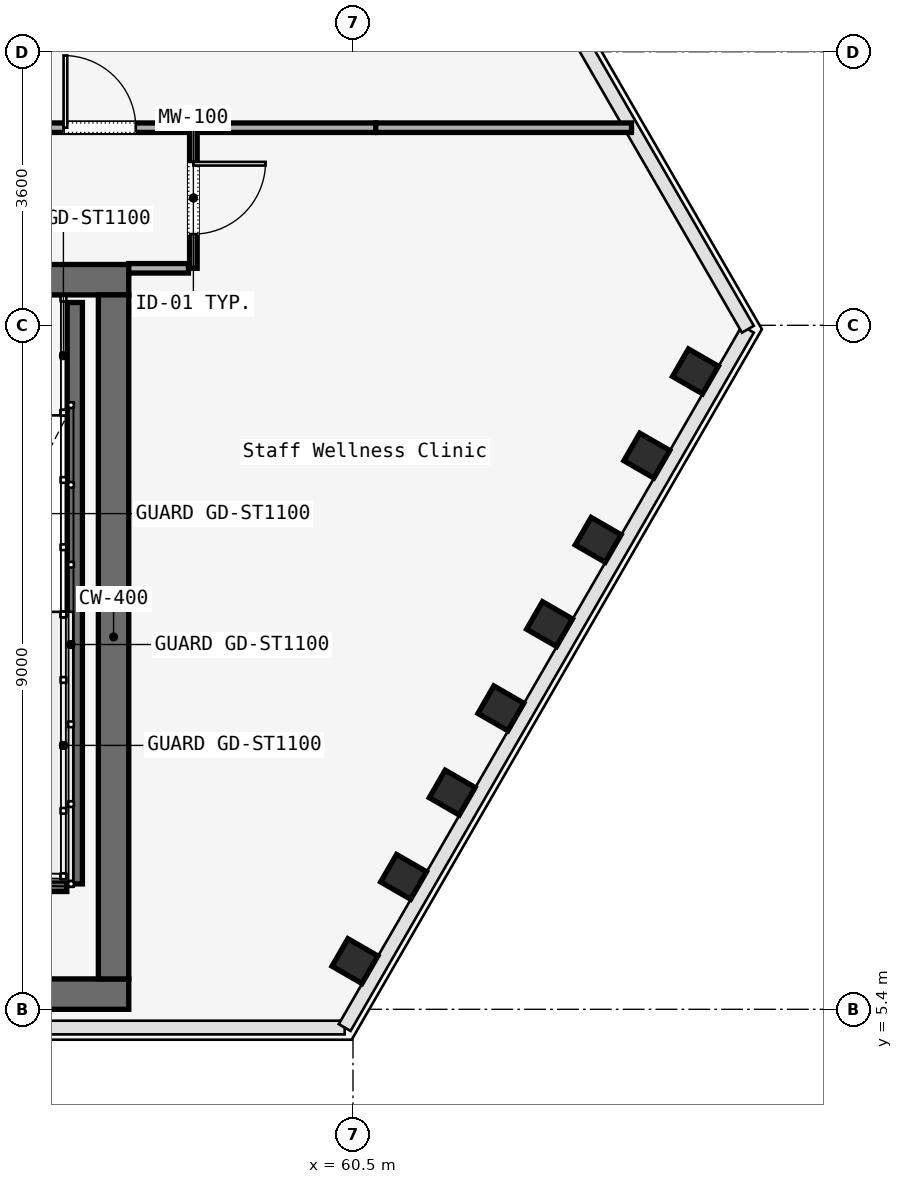
"""IFC4 building model, lengths in metres.
Left out: names, types, materials, properties, quantities, classifications, styles, units other than length and angle.
Written with IfcOpenShell. Run it as: python <this file> out.ifc"""

import sys

from ifc_helpers import new_model, si_unit, direction, frame, frame_2d, origin, origin_2d, place, context, subcontext, project, spatial, rectangle, i_section, extrude, element, fill, save


model = new_model("IFC4")
c1 = context("Model", 3, precision=1e-05, world=origin(), true_north=direction((0.0, 1.0)))
c2 = subcontext(c1, "Body", "Model", "MODEL_VIEW")
j1 = project(units=[si_unit("LENGTHUNIT", "METRE"), si_unit("PLANEANGLEUNIT", "RADIAN")], contexts=[c1])
p1 = place(None, origin())
s1 = spatial("IfcSite", under=j1, at=p1, CompositionType="ELEMENT")
p2 = place(p1, origin())
s2 = spatial("IfcBuilding", under=s1, at=p2, CompositionType="ELEMENT")
p3 = place(p2, frame((0.0, 0.0, 168.8)))
s3 = spatial("IfcBuildingStorey", under=s2, at=p3, CompositionType="ELEMENT", Elevation=168.8)
p4 = place(p3, frame((26.45, 15.0, 0.0), z_axis=(0.0, 0.0, 1.0), x_axis=(1.0, 0.0, 0.0)))
e1 = element("IfcWall", 1, at=p4, inside=s3, PredefinedType="SOLIDWALL", context=c2, shape_type="SweptSolid", body=[
    extrude(rectangle(XDim=31.1, YDim=0.4, at=frame_2d((15.55, 0.0))), origin(), (0.0, 0.0, 1.0), 3.58),
])
p5 = place(p4, frame((1.65, 0.0, 0.0)))
e2 = element("IfcOpeningElement", 2, at=p5, cuts=e1, PredefinedType="OPENING", context=c2, shape_type="SweptSolid", body=[
    extrude(rectangle(XDim=1.1, YDim=2.2, at=frame_2d((0.55, 1.1))), frame((0.0, 0.2, 0.0), z_axis=(0.0, -1.0, 0.0), x_axis=(1.0, 0.0, 0.0)), (0.0, 0.0, 1.0), 0.4),
])
p6 = place(p4, frame((13.65, 0.0, 0.0)))
e3 = element("IfcOpeningElement", 3, at=p6, cuts=e1, PredefinedType="OPENING", context=c2, shape_type="SweptSolid", body=[
    extrude(rectangle(XDim=1.1, YDim=2.2, at=frame_2d((0.55, 1.1))), frame((0.0, 0.2, 0.0), z_axis=(0.0, -1.0, 0.0), x_axis=(1.0, 0.0, 0.0)), (0.0, 0.0, 1.0), 0.4),
])
p7 = place(p4, frame((25.55, 0.0, 0.0)))
e4 = element("IfcOpeningElement", 4, at=p7, cuts=e1, PredefinedType="OPENING", context=c2, shape_type="SweptSolid", body=[
    extrude(rectangle(XDim=1.1, YDim=2.2, at=frame_2d((0.55, 1.1))), frame((0.0, 0.2, 0.0), z_axis=(0.0, -1.0, 0.0), x_axis=(1.0, 0.0, 0.0)), (0.0, 0.0, 1.0), 0.4),
])
p8 = place(p4, frame((10.7, 0.0, 0.0)))
e5 = element("IfcOpeningElement", 5, at=p8, cuts=e1, PredefinedType="OPENING", context=c2, shape_type="SweptSolid", body=[
    extrude(rectangle(XDim=1.4, YDim=2.2, at=frame_2d((0.7, 1.1))), frame((0.0, 0.2, 0.0), z_axis=(0.0, -1.0, 0.0), x_axis=(1.0, 0.0, 0.0)), (0.0, 0.0, 1.0), 0.4),
])
p9 = place(p4, frame((19.35, 0.0, 0.0)))
e6 = element("IfcOpeningElement", 6, at=p9, cuts=e1, PredefinedType="OPENING", context=c2, shape_type="SweptSolid", body=[
    extrude(rectangle(XDim=1.1, YDim=2.2, at=frame_2d((0.55, 1.1))), frame((0.0, 0.2, 0.0), z_axis=(0.0, -1.0, 0.0), x_axis=(1.0, 0.0, 0.0)), (0.0, 0.0, 1.0), 0.4),
])
p10 = place(p4, frame((21.4, 0.0, 0.0)))
e7 = element("IfcOpeningElement", 7, at=p10, cuts=e1, PredefinedType="OPENING", context=c2, shape_type="SweptSolid", body=[
    extrude(rectangle(XDim=0.9, YDim=2.1, at=frame_2d((0.45, 1.05))), frame((0.0, 0.2, 0.0), z_axis=(0.0, -1.0, 0.0), x_axis=(1.0, 0.0, 0.0)), (0.0, 0.0, 1.0), 0.4),
])
p11 = place(p4, frame((23.35, 0.0, 0.0)))
e8 = element("IfcOpeningElement", 8, at=p11, cuts=e1, PredefinedType="OPENING", context=c2, shape_type="SweptSolid", body=[
    extrude(rectangle(XDim=1.3, YDim=2.3, at=frame_2d((0.65, 1.15))), frame((0.0, 0.2, 0.0), z_axis=(0.0, -1.0, 0.0), x_axis=(1.0, 0.0, 0.0)), (0.0, 0.0, 1.0), 0.4),
])
p12 = place(p3, frame((26.45, 5.6, 0.0), z_axis=(0.0, 0.0, 1.0), x_axis=(1.0, 0.0, 0.0)))
e9 = element("IfcWall", 9, at=p12, inside=s3, PredefinedType="SOLIDWALL", context=c2, shape_type="SweptSolid", body=[
    extrude(rectangle(XDim=31.1, YDim=0.4, at=frame_2d((15.55, 0.0))), origin(), (0.0, 0.0, 1.0), 3.58),
])
p13 = place(p3, frame((57.35, 5.8, 0.0), z_axis=(0.0, 0.0, 1.0), x_axis=(0.0, 1.0, 0.0)))
e10 = element("IfcWall", 10, at=p13, inside=s3, PredefinedType="SOLIDWALL", context=c2, shape_type="SweptSolid", body=[
    extrude(rectangle(XDim=9.0, YDim=0.4, at=frame_2d((4.5, 0.0))), origin(), (0.0, 0.0, 1.0), 3.58),
])
p14 = place(p3, frame((60.526, 6.034, 0.0), z_axis=(0.082103059237, -0.008563729689, 0.996587050988), x_axis=(-0.806541885036, 0.586838564114, 0.071489071554)))
e11 = element("IfcColumn", 11, at=p14, inside=s3, PredefinedType="COLUMN", context=c2, shape_type="SweptSolid", body=[
    extrude(i_section(OverallWidth=0.418, OverallDepth=0.455, WebThickness=0.042, FlangeThickness=0.052, FilletRadius=0.015, at=origin_2d()), origin(), (0.0, 0.0, 1.0), 3.592),
])
p15 = place(p3, frame((61.166, 7.143, 0.0), z_axis=(0.072213729702, -0.025907185515, 0.997052654067), x_axis=(-0.643910482104, 0.762210461272, 0.066441732097)))
e12 = element("IfcColumn", 12, at=p15, inside=s3, PredefinedType="COLUMN", context=c2, shape_type="SweptSolid", body=[
    extrude(i_section(OverallWidth=0.418, OverallDepth=0.455, WebThickness=0.042, FlangeThickness=0.052, FilletRadius=0.015, at=origin_2d()), origin(), (0.0, 0.0, 1.0), 3.59),
])
p16 = place(p3, frame((61.806, 8.251, 0.0), z_axis=(0.062222727162, -0.043181892621, 0.997127703142), x_axis=(-0.42436373933, 0.903113037788, 0.065591597932)))
e13 = element("IfcColumn", 13, at=p16, inside=s3, PredefinedType="COLUMN", context=c2, shape_type="SweptSolid", body=[
    extrude(i_section(OverallWidth=0.418, OverallDepth=0.455, WebThickness=0.042, FlangeThickness=0.052, FilletRadius=0.015, at=origin_2d()), origin(), (0.0, 0.0, 1.0), 3.59),
])
p17 = place(p3, frame((62.446, 9.36, 0.0), z_axis=(0.052277437958, -0.060367184534, 0.996806336513), x_axis=(-0.187152330138, 0.979893443037, 0.069158120391)))
e14 = element("IfcColumn", 14, at=p17, inside=s3, PredefinedType="COLUMN", context=c2, shape_type="SweptSolid", body=[
    extrude(i_section(OverallWidth=0.418, OverallDepth=0.455, WebThickness=0.042, FlangeThickness=0.052, FilletRadius=0.015, at=origin_2d()), origin(), (0.0, 0.0, 1.0), 3.591),
])
p18 = place(p3, frame((63.086, 10.469, 0.0), z_axis=(0.042253853596, -0.07757861866, 0.996090442572), x_axis=(0.026482675883, 0.996717510238, 0.076504069583)))
e15 = element("IfcColumn", 15, at=p18, inside=s3, PredefinedType="COLUMN", context=c2, shape_type="SweptSolid", body=[
    extrude(i_section(OverallWidth=0.418, OverallDepth=0.455, WebThickness=0.042, FlangeThickness=0.052, FilletRadius=0.015, at=origin_2d()), origin(), (0.0, 0.0, 1.0), 3.594),
])
p19 = place(p3, frame((63.726, 11.577, 0.0), z_axis=(0.032299876946, -0.094660353653, 0.994985495068), x_axis=(0.194941646641, 0.976982525919, 0.08661927299)))
e16 = element("IfcColumn", 16, at=p19, inside=s3, PredefinedType="COLUMN", context=c2, shape_type="SweptSolid", body=[
    extrude(i_section(OverallWidth=0.418, OverallDepth=0.455, WebThickness=0.042, FlangeThickness=0.052, FilletRadius=0.015, at=origin_2d()), origin(), (0.0, 0.0, 1.0), 3.598),
])
p20 = place(p3, frame((64.366, 12.686, 0.0), z_axis=(0.022291333243, -0.111727685465, 0.993488812601), x_axis=(0.321993963103, 0.941586375909, 0.098666024689)))
e17 = element("IfcColumn", 17, at=p20, inside=s3, PredefinedType="COLUMN", context=c2, shape_type="SweptSolid", body=[
    extrude(i_section(OverallWidth=0.418, OverallDepth=0.455, WebThickness=0.042, FlangeThickness=0.052, FilletRadius=0.015, at=origin_2d()), origin(), (0.0, 0.0, 1.0), 3.603),
])
p21 = place(p3, frame((65.006, 13.794, 0.0), z_axis=(0.012375647772, -0.12869321153, 0.991607231039), x_axis=(0.41550177193, 0.902674887769, 0.111965729193)))
e18 = element("IfcColumn", 18, at=p21, inside=s3, PredefinedType="COLUMN", context=c2, shape_type="SweptSolid", body=[
    extrude(i_section(OverallWidth=0.418, OverallDepth=0.455, WebThickness=0.042, FlangeThickness=0.052, FilletRadius=0.015, at=origin_2d()), origin(), (0.0, 0.0, 1.0), 3.61),
])
p22 = place(p3, frame((56.84, 14.7, 0.0), z_axis=(0.0, 0.0, 1.0), x_axis=(0.0, -1.0, 0.0)))
e19 = element("IfcWall", 19, at=p22, inside=s3, PredefinedType="SOLIDWALL", context=c2, shape_type="SweptSolid", body=[
    extrude(rectangle(XDim=7.65, YDim=0.2, at=frame_2d((3.825, 0.0))), origin(), (0.0, 0.0, 1.0), 3.8),
])
p23 = place(p3, frame((53.62, 7.05, 0.0), z_axis=(0.0, 0.0, 1.0), x_axis=(1.0, 0.0, 0.0)))
e20 = element("IfcWall", 20, at=p23, inside=s3, PredefinedType="SOLIDWALL", context=c2, shape_type="SweptSolid", body=[
    extrude(rectangle(XDim=3.115, YDim=0.2, at=frame_2d((1.558, 0.0))), origin(), (0.0, 0.0, 1.0), 3.8),
])
p24 = place(p3, frame((58.4, 17.0, 0.0), z_axis=(0.0, 0.0, 1.0), x_axis=(0.0, -1.0, 0.0)))
e21 = element("IfcWall", 21, at=p24, inside=s3, PredefinedType="MOVABLE", context=c2, shape_type="SweptSolid", body=[
    extrude(rectangle(XDim=1.85, YDim=0.1, at=frame_2d((0.925, 0.0))), origin(), (0.0, 0.0, 1.0), 3.01),
])
p25 = place(p24, frame((0.45, 0.0, 0.0)))
e22 = element("IfcOpeningElement", 22, at=p25, cuts=e21, PredefinedType="OPENING", context=c2, shape_type="SweptSolid", body=[
    extrude(rectangle(XDim=0.95, YDim=2.2, at=frame_2d((0.475, 1.1))), frame((0.0, 0.05, 0.0), z_axis=(0.0, -1.0, 0.0), x_axis=(1.0, 0.0, 0.0)), (0.0, 0.0, 1.0), 0.1),
])
p26 = place(p3, frame((58.335, 15.15, 0.0), z_axis=(0.0, 0.0, 1.0), x_axis=(-1.0, 0.0, 0.0)))
e23 = element("IfcWall", 23, at=p26, inside=s3, PredefinedType="PARTITIONING", context=c2, shape_type="SweptSolid", body=[
    extrude(rectangle(XDim=0.785, YDim=0.125, at=frame_2d((0.393, 0.0))), origin(), (0.0, 0.0, 1.0), 3.01),
])
p27 = place(p3, frame((56.0, 17.0, 0.0), z_axis=(0.0, 0.0, 1.0), x_axis=(1.0, 0.0, 0.0)))
e24 = element("IfcWall", 24, at=p27, inside=s3, PredefinedType="PARTITIONING", context=c2, shape_type="SweptSolid", body=[
    extrude(rectangle(XDim=2.335, YDim=0.125, at=frame_2d((1.167, 0.0))), origin(), (0.0, 0.0, 1.0), 3.01),
])
p28 = place(p27, frame((0.692, 0.0, 0.0)))
e25 = element("IfcOpeningElement", 25, at=p28, cuts=e24, PredefinedType="OPENING", context=c2, shape_type="SweptSolid", body=[
    extrude(rectangle(XDim=0.95, YDim=2.2, at=frame_2d((0.475, 1.1))), frame((0.0, 0.062, 0.0), z_axis=(0.0, -1.0, 0.0), x_axis=(1.0, 0.0, 0.0)), (0.0, 0.0, 1.0), 0.125),
])
p29 = place(p3, frame((58.465, 17.0, 0.0), z_axis=(0.0, 0.0, 1.0), x_axis=(1.0, 0.0, 0.0)))
e26 = element("IfcWall", 26, at=p29, inside=s3, PredefinedType="PARTITIONING", context=c2, shape_type="SweptSolid", body=[
    extrude(rectangle(XDim=2.335, YDim=0.125, at=frame_2d((1.167, 0.0))), origin(), (0.0, 0.0, 1.0), 3.01),
])
p30 = place(p3, frame((60.8, 17.0, 0.0), z_axis=(0.0, 0.0, 1.0), x_axis=(1.0, 0.0, 0.0)))
e27 = element("IfcWall", 27, at=p30, inside=s3, PredefinedType="PARTITIONING", context=c2, shape_type="SweptSolid", body=[
    extrude(rectangle(XDim=3.365, YDim=0.125, at=frame_2d((1.682, 0.0))), origin(), (0.0, 0.0, 1.0), 3.01),
])
p31 = place(p25, origin())
e28 = element("IfcDoor", 28, at=p31, inside=s3, OperationType="SINGLE_SWING_RIGHT", PredefinedType="DOOR", context=c2, shape_type="SweptSolid", body=[
    extrude(rectangle(XDim=0.95, YDim=2.2, at=frame_2d((0.475, 1.1))), frame((0.0, 0.025, 0.0), z_axis=(0.0, -1.0, 0.0), x_axis=(1.0, 0.0, 0.0)), (0.0, 0.0, 1.0), 0.05),
])
fill(e22, e28)
p32 = place(p28, origin())
e29 = element("IfcDoor", 29, at=p32, inside=s3, OperationType="SINGLE_SWING_LEFT", PredefinedType="DOOR", context=c2, shape_type="SweptSolid", body=[
    extrude(rectangle(XDim=0.95, YDim=2.2, at=frame_2d((0.475, 1.1))), frame((0.0, 0.025, 0.0), z_axis=(0.0, -1.0, 0.0), x_axis=(1.0, 0.0, 0.0)), (0.0, 0.0, 1.0), 0.05),
])
fill(e25, e29)
save(model, sys.argv[1])
